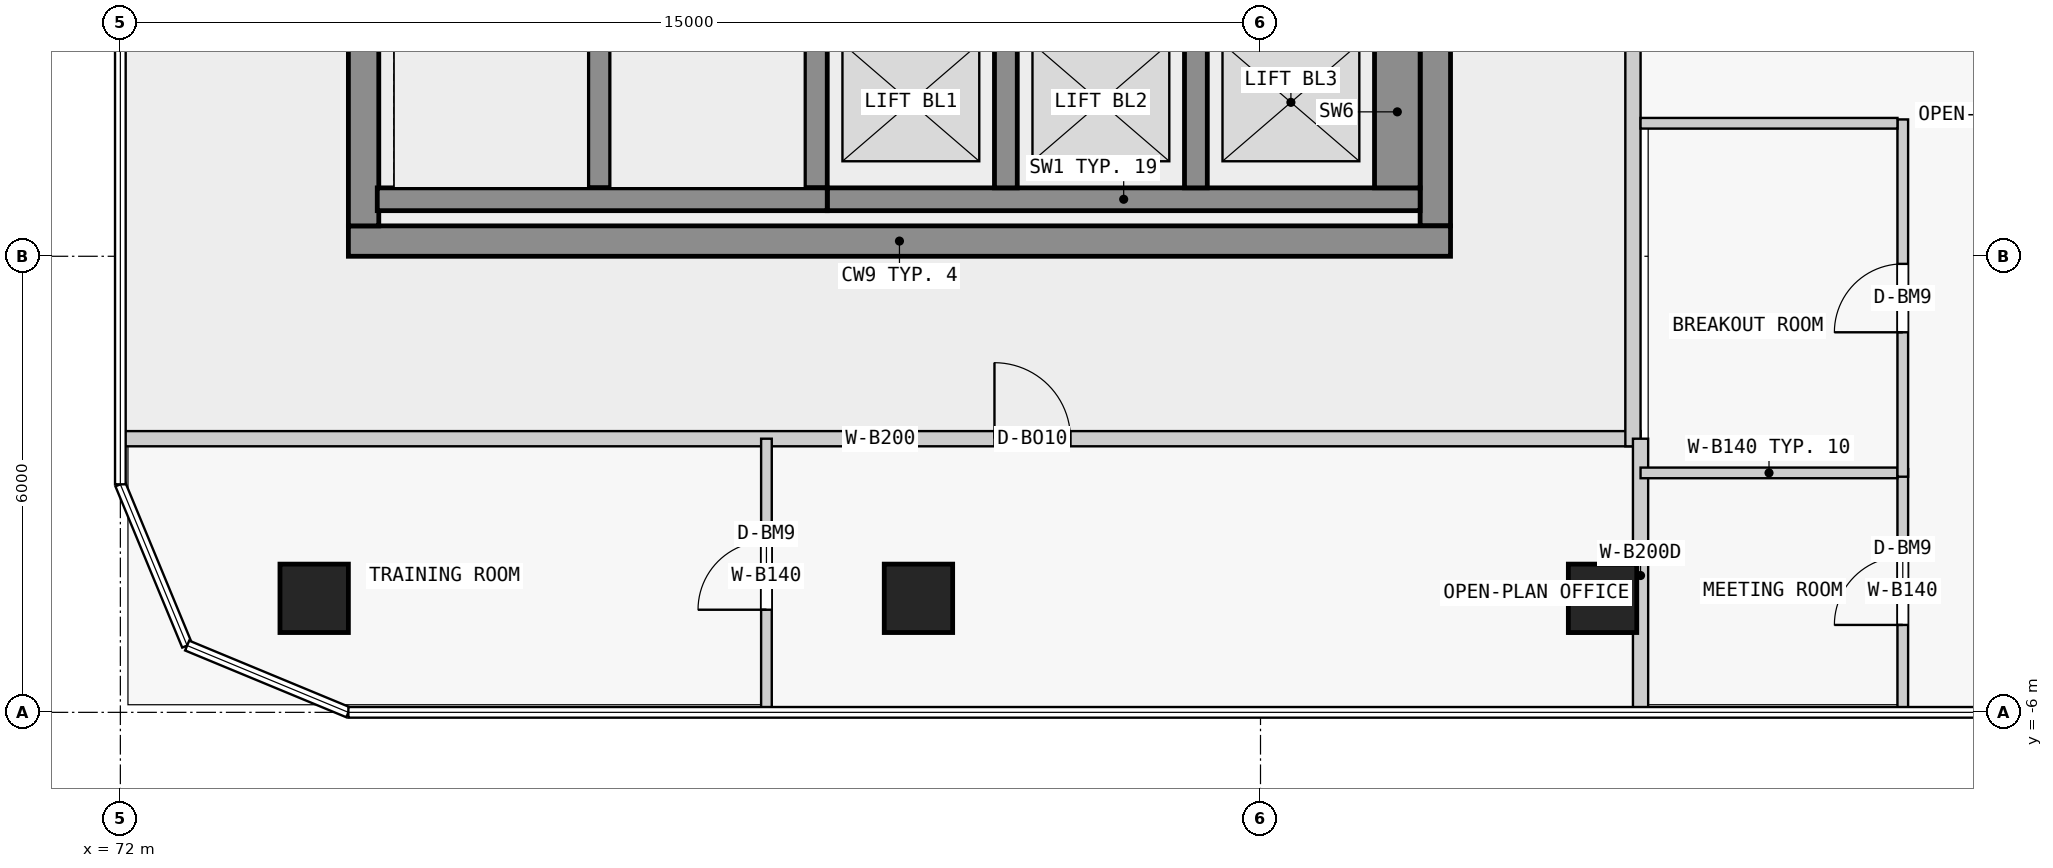
"""IFC4 building model, lengths in metres.
Left out: names, types, materials, properties, quantities, classifications, styles, units other than length and angle.
Written with IfcOpenShell. Run it as: python <this file> out.ifc"""

import sys

from ifc_helpers import new_model, si_unit, direction, frame, frame_2d, origin, origin_2d, place, context, subcontext, project, spatial, rectangle, extrude, element, fill, save


model = new_model("IFC4")
c1 = context("Model", 3, precision=1e-05, world=origin(), true_north=direction((0.0, 1.0)))
c2 = subcontext(c1, "Body", "Model", "MODEL_VIEW")
j1 = project(units=[si_unit("LENGTHUNIT", "METRE"), si_unit("PLANEANGLEUNIT", "RADIAN")], contexts=[c1])
p1 = place(None, origin())
s1 = spatial("IfcSite", under=j1, at=p1, CompositionType="ELEMENT")
p2 = place(p1, origin())
s2 = spatial("IfcBuilding", under=s1, at=p2, CompositionType="ELEMENT")
p3 = place(p2, frame((0.0, 0.0, 109.8)))
s3 = spatial("IfcBuildingStorey", under=s2, at=p3, CompositionType="ELEMENT", Elevation=109.8)
for number, where, z_axis, x_axis in (
    (1, (74.55, -4.5, 0.0), (0.0, 0.0, 1.0), (1.0, 0.0, 0.0)),
    (2, (82.5, -4.5, 0.0), (0.0, 0.0, 1.0), (1.0, 0.0, 0.0)),
    (3, (91.5, -4.5, 0.0), (0.0, 0.0, 1.0), (1.0, 0.0, 0.0)),
):
    element("IfcColumn", number, at=place(p3, frame(where, z_axis=z_axis, x_axis=x_axis)), inside=s3, PredefinedType="COLUMN", context=c2, shape_type="SweptSolid", body=[
        extrude(rectangle(XDim=0.9, YDim=0.9, at=origin_2d()), origin(), (0.0, 0.0, 1.0), 3.5),
    ])
p4 = place(p3, frame((75.0, 0.2, 0.0), z_axis=(0.0, 0.0, 1.0), x_axis=(1.0, 0.0, 0.0)))
e4 = element("IfcWall", 4, at=p4, inside=s3, PredefinedType="SHEAR", context=c2, shape_type="SweptSolid", body=[
    extrude(rectangle(XDim=14.5, YDim=0.4, at=frame_2d((7.25, 0.0))), origin(), (0.0, 0.0, 1.0), 3.25),
])
p5 = place(p3, frame((75.2, 0.4, 0.0), z_axis=(0.0, 0.0, 1.0), x_axis=(0.0, 1.0, 0.0)))
e5 = element("IfcWall", 5, at=p5, inside=s3, PredefinedType="SHEAR", context=c2, shape_type="SweptSolid", body=[
    extrude(rectangle(XDim=17.2, YDim=0.4, at=frame_2d((8.6, 0.0))), origin(), (0.0, 0.0, 1.0), 3.25),
])
p6 = place(p5, frame((7.9, 0.0, 0.0)))
e6 = element("IfcOpeningElement", 6, at=p6, cuts=e5, PredefinedType="OPENING", context=c2, shape_type="SweptSolid", body=[
    extrude(rectangle(XDim=1.8, YDim=2.1, at=frame_2d((0.9, 1.05))), frame((0.0, 0.21, 0.0), z_axis=(0.0, -1.0, 0.0), x_axis=(1.0, 0.0, 0.0)), (0.0, 0.0, 1.0), 0.42),
])
p7 = place(p3, frame((89.3, 0.4, 0.0), z_axis=(0.0, 0.0, 1.0), x_axis=(0.0, 1.0, 0.0)))
e7 = element("IfcWall", 7, at=p7, inside=s3, PredefinedType="SHEAR", context=c2, shape_type="SweptSolid", body=[
    extrude(rectangle(XDim=17.2, YDim=0.4, at=frame_2d((8.6, 0.0))), origin(), (0.0, 0.0, 1.0), 3.25),
])
p8 = place(p7, frame((7.7, 0.0, 0.0)))
e8 = element("IfcOpeningElement", 8, at=p8, cuts=e7, PredefinedType="OPENING", context=c2, shape_type="SweptSolid", body=[
    extrude(rectangle(XDim=1.8, YDim=2.1, at=frame_2d((0.9, 1.05))), frame((0.0, 0.21, 0.0), z_axis=(0.0, -1.0, 0.0), x_axis=(1.0, 0.0, 0.0)), (0.0, 0.0, 1.0), 0.42),
])
p9 = place(p7, frame((15.725, 0.0, 0.0)))
e9 = element("IfcOpeningElement", 9, at=p9, cuts=e7, PredefinedType="OPENING", context=c2, shape_type="SweptSolid", body=[
    extrude(rectangle(XDim=0.9, YDim=2.1, at=frame_2d((0.45, 1.05))), frame((0.0, 0.21, 0.0), z_axis=(0.0, -1.0, 0.0), x_axis=(1.0, 0.0, 0.0)), (0.0, 0.0, 1.0), 0.42),
])
p10 = place(p3, frame((75.38, 0.75, 0.0), z_axis=(0.0, 0.0, 1.0), x_axis=(1.0, 0.0, 0.0)))
e10 = element("IfcWall", 10, at=p10, inside=s3, PredefinedType="SHEAR", context=c2, shape_type="SweptSolid", body=[
    extrude(rectangle(XDim=5.92, YDim=0.3, at=frame_2d((2.96, 0.0))), origin(), (0.0, 0.0, 1.0), 3.25),
])
for number, where, z_axis, x_axis in (
    (11, (78.3, 0.9, 0.0), (0.0, 0.0, 1.0), (0.0, 1.0, 0.0)),
    (12, (81.15, 0.9, 0.0), (0.0, 0.0, 1.0), (0.0, 1.0, 0.0)),
):
    element("IfcWall", number, at=place(p3, frame(where, z_axis=z_axis, x_axis=x_axis)), inside=s3, PredefinedType="SHEAR", context=c2, shape_type="SweptSolid", body=[
        extrude(rectangle(XDim=6.4, YDim=0.3, at=frame_2d((3.2, 0.0))), origin(), (0.0, 0.0, 1.0), 3.25),
    ])
p11 = place(p3, frame((81.3, 0.75, 0.0), z_axis=(0.0, 0.0, 1.0), x_axis=(1.0, 0.0, 0.0)))
e13 = element("IfcWall", 13, at=p11, inside=s3, PredefinedType="SHEAR", context=c2, shape_type="SweptSolid", body=[
    extrude(rectangle(XDim=7.8, YDim=0.3, at=frame_2d((3.9, 0.0))), origin(), (0.0, 0.0, 1.0), 3.25),
])
for number, where, z_axis, x_axis in (
    (14, (83.65, 0.9, 0.0), (0.0, 0.0, 1.0), (0.0, 1.0, 0.0)),
    (15, (86.15, 0.9, 0.0), (0.0, 0.0, 1.0), (0.0, 1.0, 0.0)),
):
    element("IfcWall", number, at=place(p3, frame(where, z_axis=z_axis, x_axis=x_axis)), inside=s3, PredefinedType="SHEAR", context=c2, shape_type="SweptSolid", body=[
        extrude(rectangle(XDim=2.0, YDim=0.3, at=frame_2d((1.0, 0.0))), origin(), (0.0, 0.0, 1.0), 3.25),
    ])
p12 = place(p3, frame((88.8, 0.9, 0.0), z_axis=(0.0, 0.0, 1.0), x_axis=(0.0, 1.0, 0.0)))
e16 = element("IfcWall", 16, at=p12, inside=s3, PredefinedType="SHEAR", context=c2, shape_type="SweptSolid", body=[
    extrude(rectangle(XDim=2.0, YDim=0.6, at=frame_2d((1.0, 0.0))), origin(), (0.0, 0.0, 1.0), 3.25),
])
p13 = place(p3, frame((72.0, -2.4, 0.0), z_axis=(0.0, 0.0, 1.0), x_axis=(1.0, 0.0, 0.0)))
e17 = element("IfcWall", 17, at=p13, inside=s3, PredefinedType="PARTITIONING", context=c2, shape_type="SweptSolid", body=[
    extrude(rectangle(XDim=20.0, YDim=0.2, at=frame_2d((10.0, 0.0))), origin(), (0.0, 0.0, 1.0), 3.25),
])
p14 = place(p13, frame((11.5, 0.0, 0.0)))
e18 = element("IfcOpeningElement", 18, at=p14, cuts=e17, PredefinedType="OPENING", context=c2, shape_type="SweptSolid", body=[
    extrude(rectangle(XDim=1.0, YDim=2.4, at=frame_2d((0.5, 1.2))), frame((0.0, 0.11, 0.0), z_axis=(0.0, -1.0, 0.0), x_axis=(1.0, 0.0, 0.0)), (0.0, 0.0, 1.0), 0.22),
])
p15 = place(p3, frame((91.9, -2.5, 0.0), z_axis=(0.0, 0.0, 1.0), x_axis=(0.0, 1.0, 0.0)))
e19 = element("IfcWall", 19, at=p15, inside=s3, PredefinedType="PARTITIONING", context=c2, shape_type="SweptSolid", body=[
    extrude(rectangle(XDim=12.1, YDim=0.2, at=frame_2d((6.05, 0.0))), origin(), (0.0, 0.0, 1.0), 3.25),
])
p16 = place(p15, frame((8.3, 0.0, 0.0)))
e20 = element("IfcOpeningElement", 20, at=p16, cuts=e19, PredefinedType="OPENING", context=c2, shape_type="SweptSolid", body=[
    extrude(rectangle(XDim=1.4, YDim=2.4, at=frame_2d((0.7, 1.2))), frame((0.0, 0.11, 0.0), z_axis=(0.0, -1.0, 0.0), x_axis=(1.0, 0.0, 0.0)), (0.0, 0.0, 1.0), 0.22),
])
p17 = place(p3, frame((92.0, -6.0, 0.0), z_axis=(0.0, 0.0, 1.0), x_axis=(0.0, 1.0, 0.0)))
e21 = element("IfcWall", 21, at=p17, inside=s3, PredefinedType="PARTITIONING", context=c2, shape_type="SweptSolid", body=[
    extrude(rectangle(XDim=3.6, YDim=0.2, at=frame_2d((1.8, 0.0))), origin(), (0.0, 0.0, 1.0), 3.25),
])
p18 = place(p3, frame((80.5, -6.0, 0.0), z_axis=(0.0, 0.0, 1.0), x_axis=(0.0, 1.0, 0.0)))
e22 = element("IfcWall", 22, at=p18, inside=s3, PredefinedType="PARTITIONING", context=c2, shape_type="SweptSolid", body=[
    extrude(rectangle(XDim=3.6, YDim=0.14, at=frame_2d((1.8, 0.0))), origin(), (0.0, 0.0, 1.0), 3.25),
])
p19 = place(p18, frame((1.35, 0.0, 0.0)))
e23 = element("IfcOpeningElement", 23, at=p19, cuts=e22, PredefinedType="OPENING", context=c2, shape_type="SweptSolid", body=[
    extrude(rectangle(XDim=0.9, YDim=2.4, at=frame_2d((0.45, 1.2))), frame((0.0, 0.08, 0.0), z_axis=(0.0, -1.0, 0.0), x_axis=(1.0, 0.0, 0.0)), (0.0, 0.0, 1.0), 0.16),
])
p20 = place(p3, frame((95.45, -6.0, 0.0), z_axis=(0.0, 0.0, 1.0), x_axis=(0.0, 1.0, 0.0)))
e24 = element("IfcWall", 24, at=p20, inside=s3, PredefinedType="PARTITIONING", context=c2, shape_type="SweptSolid", body=[
    extrude(rectangle(XDim=3.2, YDim=0.14, at=frame_2d((1.6, 0.0))), origin(), (0.0, 0.0, 1.0), 3.25),
])
p21 = place(p20, frame((1.15, 0.0, 0.0)))
e25 = element("IfcOpeningElement", 25, at=p21, cuts=e24, PredefinedType="OPENING", context=c2, shape_type="SweptSolid", body=[
    extrude(rectangle(XDim=0.9, YDim=2.4, at=frame_2d((0.45, 1.2))), frame((0.0, 0.08, 0.0), z_axis=(0.0, -1.0, 0.0), x_axis=(1.0, 0.0, 0.0)), (0.0, 0.0, 1.0), 0.16),
])
p22 = place(p3, frame((92.0, -2.85, 0.0), z_axis=(0.0, 0.0, 1.0), x_axis=(1.0, 0.0, 0.0)))
e26 = element("IfcWall", 26, at=p22, inside=s3, PredefinedType="PARTITIONING", context=c2, shape_type="SweptSolid", body=[
    extrude(rectangle(XDim=3.38, YDim=0.14, at=frame_2d((1.69, 0.0))), origin(), (0.0, 0.0, 1.0), 3.25),
])
p23 = place(p3, frame((95.45, -2.9, 0.0), z_axis=(0.0, 0.0, 1.0), x_axis=(0.0, 1.0, 0.0)))
e27 = element("IfcWall", 27, at=p23, inside=s3, PredefinedType="PARTITIONING", context=c2, shape_type="SweptSolid", body=[
    extrude(rectangle(XDim=4.7, YDim=0.14, at=frame_2d((2.35, 0.0))), origin(), (0.0, 0.0, 1.0), 3.25),
])
p24 = place(p23, frame((1.9, 0.0, 0.0)))
e28 = element("IfcOpeningElement", 28, at=p24, cuts=e27, PredefinedType="OPENING", context=c2, shape_type="SweptSolid", body=[
    extrude(rectangle(XDim=0.9, YDim=2.4, at=frame_2d((0.45, 1.2))), frame((0.0, 0.08, 0.0), z_axis=(0.0, -1.0, 0.0), x_axis=(1.0, 0.0, 0.0)), (0.0, 0.0, 1.0), 0.16),
])
p25 = place(p3, frame((92.0, 1.75, 0.0), z_axis=(0.0, 0.0, 1.0), x_axis=(1.0, 0.0, 0.0)))
e29 = element("IfcWall", 29, at=p25, inside=s3, PredefinedType="PARTITIONING", context=c2, shape_type="SweptSolid", body=[
    extrude(rectangle(XDim=3.38, YDim=0.14, at=frame_2d((1.69, 0.0))), origin(), (0.0, 0.0, 1.0), 3.25),
])
p26 = place(p14, origin())
e30 = element("IfcDoor", 30, at=p26, inside=s3, OperationType="SINGLE_SWING_LEFT", PredefinedType="DOOR", context=c2, shape_type="SweptSolid", body=[
    extrude(rectangle(XDim=1.0, YDim=2.4, at=frame_2d((0.5, 1.2))), frame((0.0, 0.025, 0.0), z_axis=(0.0, -1.0, 0.0), x_axis=(1.0, 0.0, 0.0)), (0.0, 0.0, 1.0), 0.05),
])
fill(e18, e30)
p27 = place(p19, origin())
e31 = element("IfcDoor", 31, at=p27, inside=s3, OperationType="SINGLE_SWING_LEFT", PredefinedType="DOOR", context=c2, shape_type="SweptSolid", body=[
    extrude(rectangle(XDim=0.9, YDim=2.4, at=frame_2d((0.45, 1.2))), frame((0.0, 0.025, 0.0), z_axis=(0.0, -1.0, 0.0), x_axis=(1.0, 0.0, 0.0)), (0.0, 0.0, 1.0), 0.05),
])
fill(e23, e31)
p28 = place(p21, origin())
e32 = element("IfcDoor", 32, at=p28, inside=s3, OperationType="SINGLE_SWING_LEFT", PredefinedType="DOOR", context=c2, shape_type="SweptSolid", body=[
    extrude(rectangle(XDim=0.9, YDim=2.4, at=frame_2d((0.45, 1.2))), frame((0.0, 0.025, 0.0), z_axis=(0.0, -1.0, 0.0), x_axis=(1.0, 0.0, 0.0)), (0.0, 0.0, 1.0), 0.05),
])
fill(e25, e32)
p29 = place(p24, origin())
e33 = element("IfcDoor", 33, at=p29, inside=s3, OperationType="SINGLE_SWING_LEFT", PredefinedType="DOOR", context=c2, shape_type="SweptSolid", body=[
    extrude(rectangle(XDim=0.9, YDim=2.4, at=frame_2d((0.45, 1.2))), frame((0.0, 0.025, 0.0), z_axis=(0.0, -1.0, 0.0), x_axis=(1.0, 0.0, 0.0)), (0.0, 0.0, 1.0), 0.05),
])
fill(e28, e33)
save(model, sys.argv[1])
